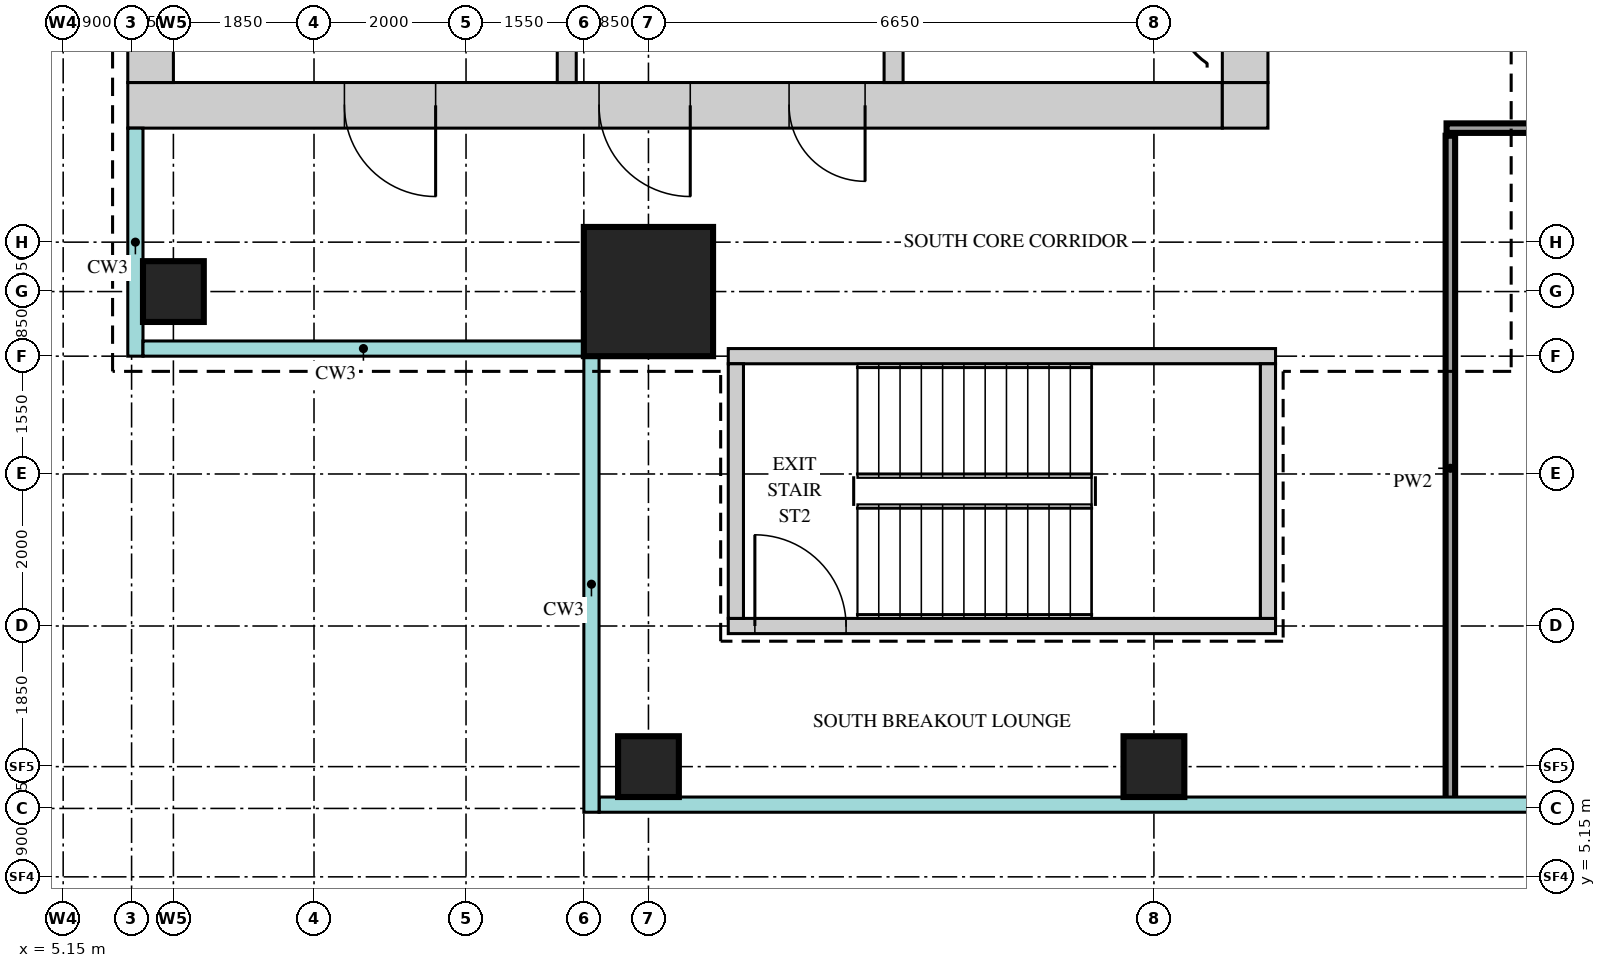
"""IFC4 building model, lengths in metres.
Left out: names, types, materials, properties, quantities, classifications, styles, units other than length and angle.
Written with IfcOpenShell. Run it as: python <this file> out.ifc"""

import sys

from ifc_helpers import new_model, si_unit, direction, frame, frame_2d, origin, origin_2d, place, context, subcontext, project, spatial, rectangle, extrude, source, transform, mapped, element, fill, save


model = new_model("IFC4")
c1 = context("Model", 3, precision=1e-05, world=origin(), true_north=direction((0.0, 1.0)))
c2 = subcontext(c1, "Body", "Model", "MODEL_VIEW")
j1 = project(units=[si_unit("LENGTHUNIT", "METRE"), si_unit("PLANEANGLEUNIT", "RADIAN")], contexts=[c1])
p1 = place(None, origin())
s1 = spatial("IfcSite", under=j1, at=p1, CompositionType="ELEMENT")
p2 = place(p1, origin())
s2 = spatial("IfcBuilding", under=s1, at=p2, CompositionType="ELEMENT")
p3 = place(p2, frame((0.0, 0.0, 322.2)))
s3 = spatial("IfcBuildingStorey", under=s2, at=p3, CompositionType="ELEMENT", Elevation=322.2)
m1 = source(origin(), c2, "Body", "SweptSolid", [
    extrude(rectangle(XDim=14.4, YDim=0.6, at=frame_2d((7.2, 0.0))), origin(), (0.0, 0.0, 1.0), 3.75),
])
p4 = place(p3, frame((6.0, 15.3, 0.0), z_axis=(0.0, 0.0, 1.0), x_axis=(1.0, 0.0, 0.0)))
e1 = element("IfcWall", 1, at=p4, inside=s3, PredefinedType="SHEAR", context=c2, shape_type="MappedRepresentation", body=[
    mapped(m1, transform((0.0, 0.0, 0.0))),
])
m2 = source(origin(), c2, "Body", "SweptSolid", [
    extrude(rectangle(XDim=1.2, YDim=2.1, at=frame_2d((0.6, 1.05))), frame((0.0, 0.31, 0.0), z_axis=(0.0, -1.0, 0.0), x_axis=(1.0, 0.0, 0.0)), (0.0, 0.0, 1.0), 0.62),
])
p5 = place(p4, frame((6.2, 0.0, 0.0)))
e2 = element("IfcOpeningElement", 2, at=p5, cuts=e1, PredefinedType="OPENING", context=c2, shape_type="MappedRepresentation", body=[
    mapped(m2, transform((0.0, 0.0, 0.0))),
])
p6 = place(p4, frame((2.85, 0.0, 0.0)))
e3 = element("IfcOpeningElement", 3, at=p6, cuts=e1, PredefinedType="OPENING", context=c2, shape_type="MappedRepresentation", body=[
    mapped(m2, transform((0.0, 0.0, 0.0))),
])
m3 = source(origin(), c2, "Body", "SweptSolid", [
    extrude(rectangle(XDim=1.0, YDim=2.1, at=frame_2d((0.5, 1.05))), frame((0.0, 0.31, 0.0), z_axis=(0.0, -1.0, 0.0), x_axis=(1.0, 0.0, 0.0)), (0.0, 0.0, 1.0), 0.62),
])
p7 = place(p4, frame((8.7, 0.0, 0.0)))
e4 = element("IfcOpeningElement", 4, at=p7, cuts=e1, PredefinedType="OPENING", context=c2, shape_type="MappedRepresentation", body=[
    mapped(m3, transform((0.0, 0.0, 0.0))),
])
m4 = source(origin(), c2, "Body", "SweptSolid", [
    extrude(rectangle(XDim=0.6, YDim=0.6, at=frame_2d((0.3, 0.0))), origin(), (0.0, 0.0, 1.0), 3.75),
])
p8 = place(p3, frame((20.4, 15.3, 0.0), z_axis=(0.0, 0.0, 1.0), x_axis=(1.0, 0.0, 0.0)))
e5 = element("IfcWall", 5, at=p8, inside=s3, PredefinedType="SHEAR", context=c2, shape_type="MappedRepresentation", body=[
    mapped(m4, transform((0.0, 0.0, 0.0))),
])
m5 = source(origin(), c2, "Body", "SweptSolid", [
    extrude(rectangle(XDim=22.8, YDim=0.6, at=frame_2d((11.4, 0.0))), origin(), (0.0, 0.0, 1.0), 3.75),
])
p9 = place(p3, frame((20.7, 15.6, 0.0), z_axis=(0.0, 0.0, 1.0), x_axis=(0.0, 1.0, 0.0)))
e6 = element("IfcWall", 6, at=p9, inside=s3, PredefinedType="SHEAR", context=c2, shape_type="MappedRepresentation", body=[
    mapped(m5, transform((0.0, 0.0, 0.0))),
])
m6 = source(origin(), c2, "Body", "SweptSolid", [
    extrude(rectangle(XDim=1.8, YDim=2.1, at=frame_2d((0.9, 1.05))), frame((0.0, 0.31, 0.0), z_axis=(0.0, -1.0, 0.0), x_axis=(1.0, 0.0, 0.0)), (0.0, 0.0, 1.0), 0.62),
])
p10 = place(p9, frame((10.9, 0.0, 0.0)))
e7 = element("IfcOpeningElement", 7, at=p10, cuts=e6, PredefinedType="OPENING", context=c2, shape_type="MappedRepresentation", body=[
    mapped(m6, transform((0.0, 0.0, 0.0))),
])
m7 = source(origin(), c2, "Body", "SweptSolid", [
    extrude(rectangle(XDim=0.9, YDim=2.1, at=frame_2d((0.45, 1.05))), frame((0.0, 0.31, 0.0), z_axis=(0.0, -1.0, 0.0), x_axis=(1.0, 0.0, 0.0)), (0.0, 0.0, 1.0), 0.62),
])
p11 = place(p9, frame((0.55, 0.0, 0.0)))
e8 = element("IfcOpeningElement", 8, at=p11, cuts=e6, PredefinedType="OPENING", context=c2, shape_type="MappedRepresentation", body=[
    mapped(m7, transform((0.0, 0.0, 0.0))),
])
p12 = place(p9, frame((4.1, 0.0, 0.0)))
e9 = element("IfcOpeningElement", 9, at=p12, cuts=e6, PredefinedType="OPENING", context=c2, shape_type="MappedRepresentation", body=[
    mapped(m7, transform((0.0, 0.0, 0.0))),
])
p13 = place(p3, frame((6.3, 15.6, 0.0), z_axis=(0.0, 0.0, 1.0), x_axis=(0.0, 1.0, 0.0)))
e10 = element("IfcWall", 10, at=p13, inside=s3, PredefinedType="SHEAR", context=c2, shape_type="MappedRepresentation", body=[
    mapped(m5, transform((0.0, 0.0, 0.0))),
])
m8 = source(origin(), c2, "Body", "SweptSolid", [
    extrude(rectangle(XDim=7.2, YDim=0.2, at=frame_2d((3.6, 0.0))), origin(), (0.0, 0.0, 1.0), 3.75),
])
p14 = place(p3, frame((13.9, 12.0, 0.0), z_axis=(0.0, 0.0, 1.0), x_axis=(1.0, 0.0, 0.0)))
e11 = element("IfcWall", 11, at=p14, inside=s3, PredefinedType="SHEAR", context=c2, shape_type="MappedRepresentation", body=[
    mapped(m8, transform((0.0, 0.0, 0.0))),
])
p15 = place(p3, frame((13.9, 8.45, 0.0), z_axis=(0.0, 0.0, 1.0), x_axis=(1.0, 0.0, 0.0)))
e12 = element("IfcWall", 12, at=p15, inside=s3, PredefinedType="SHEAR", context=c2, shape_type="MappedRepresentation", body=[
    mapped(m8, transform((0.0, 0.0, 0.0))),
])
m9 = source(origin(), c2, "Body", "SweptSolid", [
    extrude(rectangle(XDim=1.2, YDim=2.1, at=frame_2d((0.6, 1.05))), frame((0.0, 0.11, 0.0), z_axis=(0.0, -1.0, 0.0), x_axis=(1.0, 0.0, 0.0)), (0.0, 0.0, 1.0), 0.22),
])
p16 = place(p15, frame((0.35, 0.0, 0.0)))
e13 = element("IfcOpeningElement", 13, at=p16, cuts=e12, PredefinedType="OPENING", context=c2, shape_type="MappedRepresentation", body=[
    mapped(m9, transform((0.0, 0.0, 0.0))),
])
m10 = source(origin(), c2, "Body", "SweptSolid", [
    extrude(rectangle(XDim=3.35, YDim=0.2, at=frame_2d((1.675, 0.0))), origin(), (0.0, 0.0, 1.0), 3.75),
])
for number, where, z_axis, x_axis in (
    (14, (21.0, 8.55, 0.0), (0.0, 0.0, 1.0), (0.0, 1.0, 0.0)),
    (15, (14.0, 8.55, 0.0), (0.0, 0.0, 1.0), (0.0, 1.0, 0.0)),
):
    element("IfcWall", number, at=place(p3, frame(where, z_axis=z_axis, x_axis=x_axis)), inside=s3, PredefinedType="SHEAR", context=c2, shape_type="MappedRepresentation", body=[
        mapped(m10, transform((0.0, 0.0, 0.0))),
    ])
m11 = source(origin(), c2, "Body", "SweptSolid", [
    extrude(rectangle(XDim=3.6, YDim=0.25, at=frame_2d((1.8, 0.0))), origin(), (0.0, 0.0, 1.0), 3.75),
])
for number, where, z_axis, x_axis in (
    (16, (16.075, 15.6, 0.0), (0.0, 0.0, 1.0), (0.0, 1.0, 0.0)),
    (17, (11.775, 15.6, 0.0), (0.0, 0.0, 1.0), (0.0, 1.0, 0.0)),
):
    element("IfcWall", number, at=place(p3, frame(where, z_axis=z_axis, x_axis=x_axis)), inside=s3, PredefinedType="STANDARD", context=c2, shape_type="MappedRepresentation", body=[
        mapped(m11, transform((0.0, 0.0, 0.0))),
    ])
m12 = source(origin(), c2, "Body", "SweptSolid", [
    extrude(rectangle(XDim=1.7, YDim=1.7, at=origin_2d()), origin(), (0.0, 0.0, 1.0), 3.75),
])
p17 = place(p3, frame((12.85, 12.85, 0.0), z_axis=(0.0, 0.0, 1.0), x_axis=(1.0, 0.0, 0.0)))
e18 = element("IfcColumn", 18, at=p17, inside=s3, PredefinedType="COLUMN", context=c2, shape_type="MappedRepresentation", body=[
    mapped(m12, transform((0.0, 0.0, 0.0))),
])
m13 = source(origin(), c2, "Body", "SweptSolid", [
    extrude(rectangle(XDim=0.8, YDim=0.8, at=origin_2d()), origin(), (0.0, 0.0, 1.0), 3.75),
])
for number, where, z_axis, x_axis in (
    (19, (12.85, 6.6, 0.0), (0.0, 0.0, 1.0), (1.0, 0.0, 0.0)),
    (20, (19.5, 6.6, 0.0), (0.0, 0.0, 1.0), (1.0, 0.0, 0.0)),
    (21, (6.6, 12.85, 0.0), (0.0, 0.0, 1.0), (1.0, 0.0, 0.0)),
):
    element("IfcColumn", number, at=place(p3, frame(where, z_axis=z_axis, x_axis=x_axis)), inside=s3, PredefinedType="COLUMN", context=c2, shape_type="MappedRepresentation", body=[
        mapped(m13, transform((0.0, 0.0, 0.0))),
    ])
m14 = source(origin(), c2, "Body", "SweptSolid", [
    extrude(rectangle(XDim=8.75, YDim=0.125, at=frame_2d((4.375, 0.0))), origin(), (0.0, 0.0, 1.0), 3.8),
])
p18 = place(p3, frame((23.4, 6.15, 0.0), z_axis=(0.0, 0.0, 1.0), x_axis=(0.0, 1.0, 0.0)))
e22 = element("IfcWall", 22, at=p18, inside=s3, PredefinedType="PARTITIONING", context=c2, shape_type="MappedRepresentation", body=[
    mapped(m14, transform((0.0, 0.0, 0.0))),
])
m15 = source(origin(), c2, "Body", "SweptSolid", [
    extrude(rectangle(XDim=19.1, YDim=0.125, at=frame_2d((9.55, 0.0))), origin(), (0.0, 0.0, 1.0), 3.8),
])
p19 = place(p3, frame((23.35, 15.0, 0.0), z_axis=(0.0, 0.0, 1.0), x_axis=(1.0, 0.0, 0.0)))
e23 = element("IfcWall", 23, at=p19, inside=s3, PredefinedType="PARTITIONING", context=c2, shape_type="MappedRepresentation", body=[
    mapped(m15, transform((0.0, 0.0, 0.0))),
])
m16 = source(origin(), c2, "Body", "SweptSolid", [
    extrude(rectangle(XDim=0.9, YDim=2.1, at=frame_2d((0.45, 1.05))), frame((0.0, 0.073, 0.0), z_axis=(0.0, -1.0, 0.0), x_axis=(1.0, 0.0, 0.0)), (0.0, 0.0, 1.0), 0.145),
])
p20 = place(p19, frame((5.3, 0.0, 0.0)))
e24 = element("IfcOpeningElement", 24, at=p20, cuts=e23, PredefinedType="OPENING", context=c2, shape_type="MappedRepresentation", body=[
    mapped(m16, transform((0.0, 0.0, 0.0))),
])
p21 = place(p19, frame((13.3, 0.0, 0.0)))
e25 = element("IfcOpeningElement", 25, at=p21, cuts=e23, PredefinedType="OPENING", context=c2, shape_type="MappedRepresentation", body=[
    mapped(m16, transform((0.0, 0.0, 0.0))),
])
m17 = source(origin(), c2, "Body", "SweptSolid", [
    extrude(rectangle(XDim=1.2, YDim=2.1, at=frame_2d((0.6, 1.05))), frame((0.0, 0.25, 0.0), z_axis=(0.0, -1.0, 0.0), x_axis=(1.0, 0.0, 0.0)), (0.0, 0.0, 1.0), 0.5),
])
p22 = place(p5, origin())
e26 = element("IfcDoor", 26, at=p22, inside=s3, OperationType="SINGLE_SWING_RIGHT", PredefinedType="DOOR", context=c2, shape_type="MappedRepresentation", body=[
    mapped(m17, transform((0.0, 0.0, 0.0))),
])
fill(e2, e26)
p23 = place(p6, origin())
e27 = element("IfcDoor", 27, at=p23, inside=s3, OperationType="SINGLE_SWING_RIGHT", PredefinedType="DOOR", context=c2, shape_type="MappedRepresentation", body=[
    mapped(m17, transform((0.0, 0.0, 0.0))),
])
fill(e3, e27)
m18 = source(origin(), c2, "Body", "SweptSolid", [
    extrude(rectangle(XDim=1.0, YDim=2.1, at=frame_2d((0.5, 1.05))), frame((0.0, 0.25, 0.0), z_axis=(0.0, -1.0, 0.0), x_axis=(1.0, 0.0, 0.0)), (0.0, 0.0, 1.0), 0.5),
])
p24 = place(p7, origin())
e28 = element("IfcDoor", 28, at=p24, inside=s3, OperationType="SINGLE_SWING_RIGHT", PredefinedType="DOOR", context=c2, shape_type="MappedRepresentation", body=[
    mapped(m18, transform((0.0, 0.0, 0.0))),
])
fill(e4, e28)
m19 = source(origin(), c2, "Body", "SweptSolid", [
    extrude(rectangle(XDim=1.2, YDim=2.1, at=frame_2d((0.6, 1.05))), frame((0.0, 0.025, 0.0), z_axis=(0.0, -1.0, 0.0), x_axis=(1.0, 0.0, 0.0)), (0.0, 0.0, 1.0), 0.05),
])
p25 = place(p16, origin())
e29 = element("IfcDoor", 29, at=p25, inside=s3, OperationType="SINGLE_SWING_RIGHT", PredefinedType="DOOR", context=c2, shape_type="MappedRepresentation", body=[
    mapped(m19, transform((0.0, 0.0, 0.0))),
])
fill(e13, e29)
save(model, sys.argv[1])
